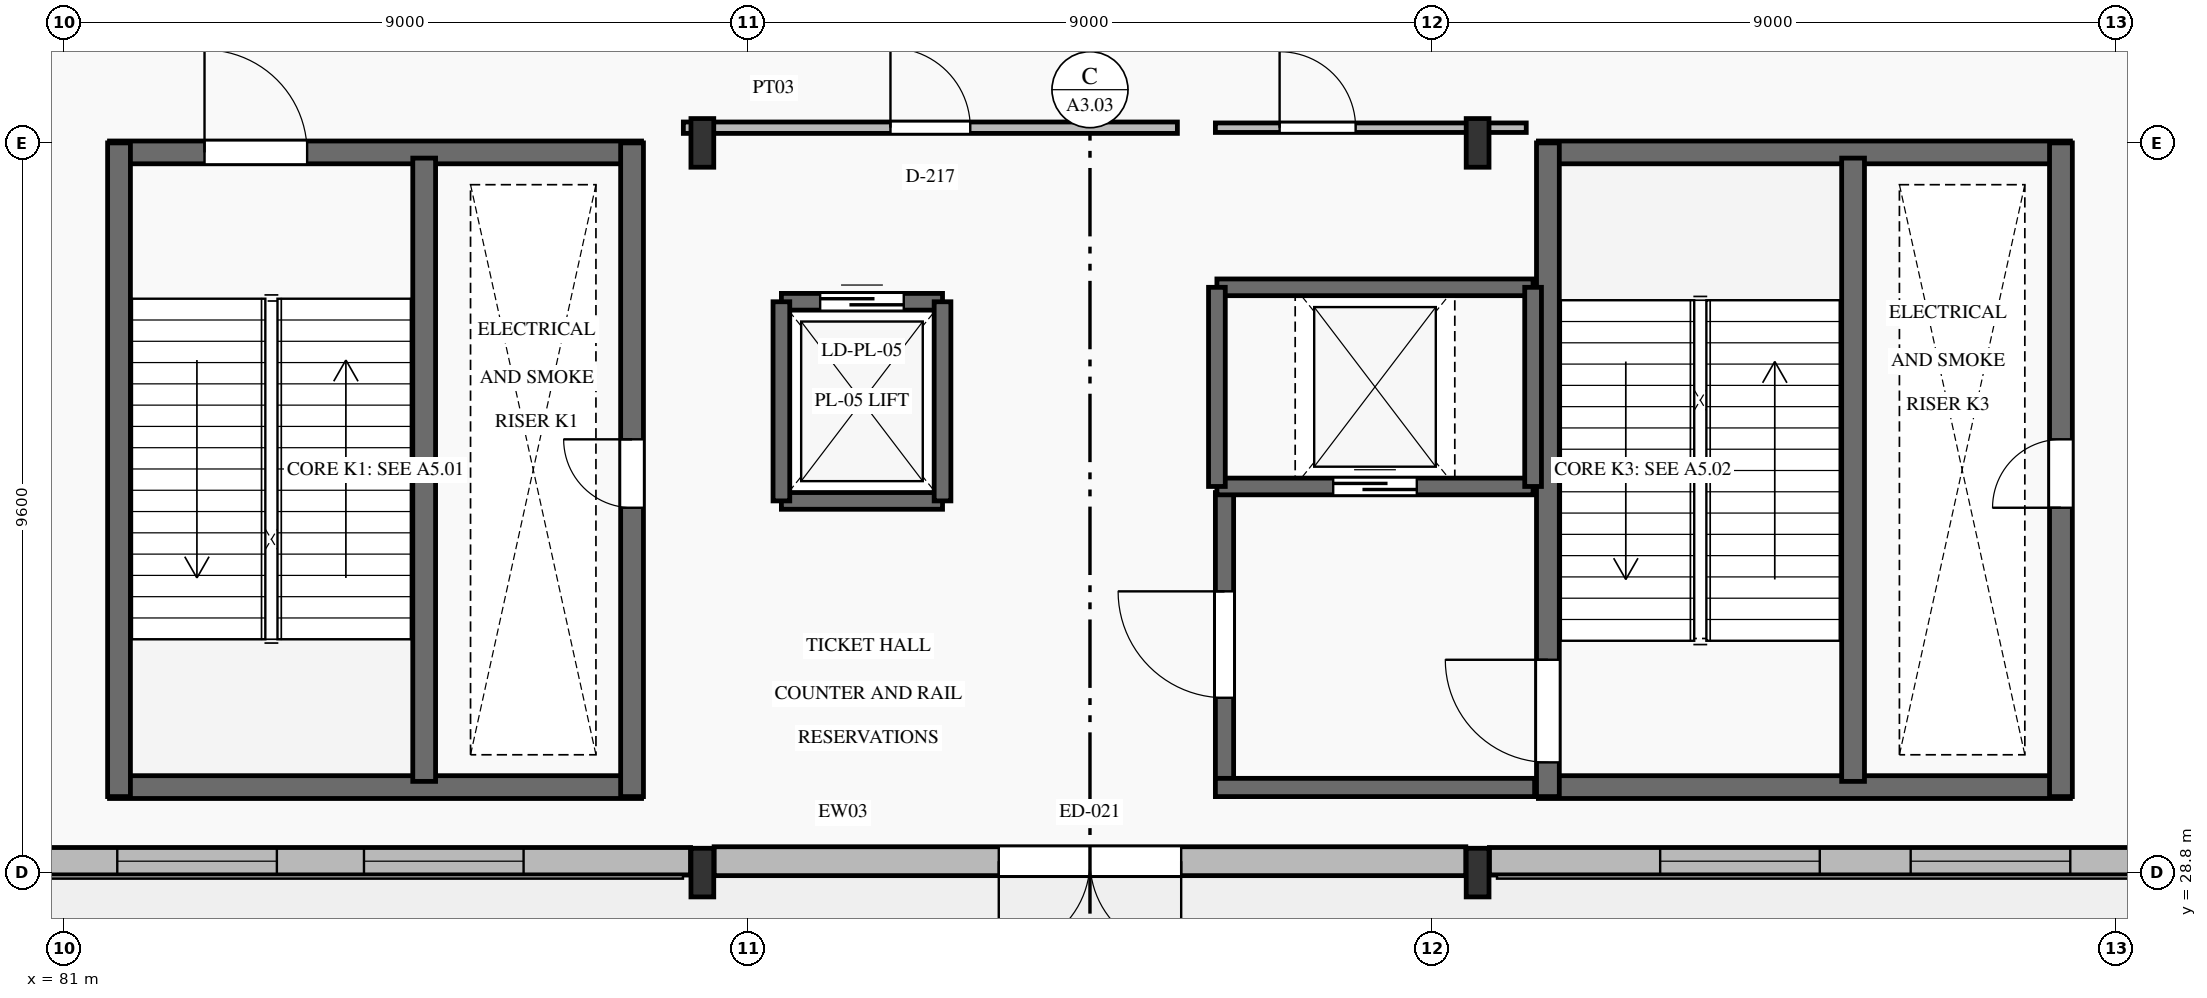
"""IFC4 building model, lengths in metres.
Left out: names, types, materials, properties, quantities, classifications, styles, units other than length and angle.
Written with IfcOpenShell. Run it as: python <this file> out.ifc"""

import sys

from ifc_helpers import new_model, si_unit, direction, frame, frame_2d, origin, origin_2d, place, context, subcontext, project, spatial, rectangle, i_section, extrude, element, fill, save


model = new_model("IFC4")
c1 = context("Model", 3, precision=1e-05, world=origin(), true_north=direction((0.0, 1.0)))
c2 = subcontext(c1, "Body", "Model", "MODEL_VIEW")
j1 = project(units=[si_unit("LENGTHUNIT", "METRE"), si_unit("PLANEANGLEUNIT", "RADIAN")], contexts=[c1])
p1 = place(None, origin())
s1 = spatial("IfcSite", under=j1, at=p1, CompositionType="ELEMENT")
p2 = place(p1, origin())
s2 = spatial("IfcBuilding", under=s1, at=p2, CompositionType="ELEMENT")
p3 = place(p2, origin())
s3 = spatial("IfcBuildingStorey", under=s2, at=p3, CompositionType="ELEMENT", Elevation=0.0)
for number, where, z_axis, x_axis in (
    (1, (89.4, 28.8, 0.0), (0.0, 0.0, 1.0), (1.0, 0.0, 0.0)),
    (2, (89.4, 38.4, 0.0), (0.0, 0.0, 1.0), (1.0, 0.0, 0.0)),
    (3, (99.6, 28.8, 0.0), (0.0, 0.0, 1.0), (1.0, 0.0, 0.0)),
    (4, (99.6, 38.4, 0.0), (0.0, 0.0, 1.0), (1.0, 0.0, 0.0)),
):
    element("IfcColumn", number, at=place(p3, frame(where, z_axis=z_axis, x_axis=x_axis)), inside=s3, PredefinedType="COLUMN", context=c2, shape_type="SweptSolid", body=[
        extrude(i_section(OverallWidth=0.3, OverallDepth=0.64, WebThickness=0.013, FlangeThickness=0.026, FilletRadius=0.027, at=origin_2d()), origin(), (0.0, 0.0, 1.0), 6.0),
    ])
p4 = place(p3, frame((79.505, 28.95, 0.0), z_axis=(0.0, 0.0, 1.0), x_axis=(1.0, 0.0, 0.0)))
e5 = element("IfcWall", 5, at=p4, inside=s3, PredefinedType="SOLIDWALL", context=c2, shape_type="SweptSolid", body=[
    extrude(rectangle(XDim=9.74, YDim=0.36, at=frame_2d((4.87, 0.0))), origin(), (0.0, 0.0, 1.0), 4.92),
])
p5 = place(p4, frame((2.197, 0.0, 0.9)))
e6 = element("IfcOpeningElement", 6, at=p5, cuts=e5, PredefinedType="OPENING", context=c2, shape_type="SweptSolid", body=[
    extrude(rectangle(XDim=2.1, YDim=3.0, at=frame_2d((1.05, 1.5))), frame((0.0, 0.195, 0.0), z_axis=(0.0, -1.0, 0.0), x_axis=(1.0, 0.0, 0.0)), (0.0, 0.0, 1.0), 0.39),
])
p6 = place(p4, frame((5.443, 0.0, 0.9)))
e7 = element("IfcOpeningElement", 7, at=p6, cuts=e5, PredefinedType="OPENING", context=c2, shape_type="SweptSolid", body=[
    extrude(rectangle(XDim=2.1, YDim=3.0, at=frame_2d((1.05, 1.5))), frame((0.0, 0.195, 0.0), z_axis=(0.0, -1.0, 0.0), x_axis=(1.0, 0.0, 0.0)), (0.0, 0.0, 1.0), 0.39),
])
p7 = place(p3, frame((89.555, 28.95, 0.0), z_axis=(0.0, 0.0, 1.0), x_axis=(1.0, 0.0, 0.0)))
e8 = element("IfcWall", 8, at=p7, inside=s3, PredefinedType="SOLIDWALL", context=c2, shape_type="SweptSolid", body=[
    extrude(rectangle(XDim=9.89, YDim=0.38, at=frame_2d((4.945, 0.0))), origin(), (0.0, 0.0, 1.0), 4.92),
])
p8 = place(p7, frame((3.745, 0.0, 0.0)))
e9 = element("IfcOpeningElement", 9, at=p8, cuts=e8, PredefinedType="OPENING", context=c2, shape_type="SweptSolid", body=[
    extrude(rectangle(XDim=2.4, YDim=2.5, at=frame_2d((1.2, 1.25))), frame((0.0, 0.205, 0.0), z_axis=(0.0, -1.0, 0.0), x_axis=(1.0, 0.0, 0.0)), (0.0, 0.0, 1.0), 0.41),
])
p9 = place(p3, frame((99.755, 28.95, 0.0), z_axis=(0.0, 0.0, 1.0), x_axis=(1.0, 0.0, 0.0)))
e10 = element("IfcWall", 10, at=p9, inside=s3, PredefinedType="SOLIDWALL", context=c2, shape_type="SweptSolid", body=[
    extrude(rectangle(XDim=9.89, YDim=0.36, at=frame_2d((4.945, 0.0))), origin(), (0.0, 0.0, 1.0), 4.92),
])
p10 = place(p9, frame((2.247, 0.0, 0.9)))
e11 = element("IfcOpeningElement", 11, at=p10, cuts=e10, PredefinedType="OPENING", context=c2, shape_type="SweptSolid", body=[
    extrude(rectangle(XDim=2.1, YDim=3.0, at=frame_2d((1.05, 1.5))), frame((0.0, 0.195, 0.0), z_axis=(0.0, -1.0, 0.0), x_axis=(1.0, 0.0, 0.0)), (0.0, 0.0, 1.0), 0.39),
])
p11 = place(p9, frame((5.543, 0.0, 0.9)))
e12 = element("IfcOpeningElement", 12, at=p11, cuts=e10, PredefinedType="OPENING", context=c2, shape_type="SweptSolid", body=[
    extrude(rectangle(XDim=2.1, YDim=3.0, at=frame_2d((1.05, 1.5))), frame((0.0, 0.195, 0.0), z_axis=(0.0, -1.0, 0.0), x_axis=(1.0, 0.0, 0.0)), (0.0, 0.0, 1.0), 0.39),
])
p12 = place(p3, frame((81.6, 29.925, 0.0), z_axis=(0.0, 0.0, 1.0), x_axis=(1.0, 0.0, 0.0)))
e13 = element("IfcWall", 13, at=p12, inside=s3, PredefinedType="SHEAR", context=c2, shape_type="SweptSolid", body=[
    extrude(rectangle(XDim=7.0, YDim=0.3, at=frame_2d((3.5, 0.0))), origin(), (0.0, 0.0, 1.0), 6.0),
])
p13 = place(p3, frame((81.6, 38.275, 0.0), z_axis=(0.0, 0.0, 1.0), x_axis=(1.0, 0.0, 0.0)))
e14 = element("IfcWall", 14, at=p13, inside=s3, PredefinedType="SHEAR", context=c2, shape_type="SweptSolid", body=[
    extrude(rectangle(XDim=7.0, YDim=0.3, at=frame_2d((3.5, 0.0))), origin(), (0.0, 0.0, 1.0), 6.0),
])
p14 = place(p13, frame((1.25, 0.0, 0.0)))
e15 = element("IfcOpeningElement", 15, at=p14, cuts=e14, PredefinedType="OPENING", context=c2, shape_type="SweptSolid", body=[
    extrude(rectangle(XDim=1.35, YDim=2.2, at=frame_2d((0.675, 1.1))), frame((0.0, 0.165, 0.0), z_axis=(0.0, -1.0, 0.0), x_axis=(1.0, 0.0, 0.0)), (0.0, 0.0, 1.0), 0.33),
])
p15 = place(p3, frame((81.725, 29.8, 0.0), z_axis=(0.0, 0.0, 1.0), x_axis=(0.0, 1.0, 0.0)))
e16 = element("IfcWall", 16, at=p15, inside=s3, PredefinedType="SHEAR", context=c2, shape_type="SweptSolid", body=[
    extrude(rectangle(XDim=8.6, YDim=0.3, at=frame_2d((4.3, 0.0))), origin(), (0.0, 0.0, 1.0), 6.0),
])
p16 = place(p3, frame((88.475, 29.8, 0.0), z_axis=(0.0, 0.0, 1.0), x_axis=(0.0, 1.0, 0.0)))
e17 = element("IfcWall", 17, at=p16, inside=s3, PredefinedType="SHEAR", context=c2, shape_type="SweptSolid", body=[
    extrude(rectangle(XDim=8.6, YDim=0.3, at=frame_2d((4.3, 0.0))), origin(), (0.0, 0.0, 1.0), 6.0),
])
p17 = place(p16, frame((3.8, 0.0, 0.0)))
e18 = element("IfcOpeningElement", 18, at=p17, cuts=e17, PredefinedType="OPENING", context=c2, shape_type="SweptSolid", body=[
    extrude(rectangle(XDim=0.9, YDim=2.05, at=frame_2d((0.45, 1.025))), frame((0.0, 0.165, 0.0), z_axis=(0.0, -1.0, 0.0), x_axis=(1.0, 0.0, 0.0)), (0.0, 0.0, 1.0), 0.33),
])
p18 = place(p3, frame((85.74, 30.0, 0.0), z_axis=(0.0, 0.0, 1.0), x_axis=(0.0, 1.0, 0.0)))
e19 = element("IfcWall", 19, at=p18, inside=s3, PredefinedType="SHEAR", context=c2, shape_type="SweptSolid", body=[
    extrude(rectangle(XDim=8.2, YDim=0.3, at=frame_2d((4.1, 0.0))), origin(), (0.0, 0.0, 1.0), 6.0),
])
for number, where, z_axis, x_axis in (
    (20, (100.4, 29.925, 0.0), (0.0, 0.0, 1.0), (1.0, 0.0, 0.0)),
    (21, (100.4, 38.275, 0.0), (0.0, 0.0, 1.0), (1.0, 0.0, 0.0)),
):
    element("IfcWall", number, at=place(p3, frame(where, z_axis=z_axis, x_axis=x_axis)), inside=s3, PredefinedType="SHEAR", context=c2, shape_type="SweptSolid", body=[
        extrude(rectangle(XDim=7.0, YDim=0.3, at=frame_2d((3.5, 0.0))), origin(), (0.0, 0.0, 1.0), 6.0),
    ])
p19 = place(p3, frame((100.525, 29.8, 0.0), z_axis=(0.0, 0.0, 1.0), x_axis=(0.0, 1.0, 0.0)))
e22 = element("IfcWall", 22, at=p19, inside=s3, PredefinedType="SHEAR", context=c2, shape_type="SweptSolid", body=[
    extrude(rectangle(XDim=8.6, YDim=0.3, at=frame_2d((4.3, 0.0))), origin(), (0.0, 0.0, 1.0), 6.0),
])
p20 = place(p19, frame((0.45, 0.0, 0.0)))
e23 = element("IfcOpeningElement", 23, at=p20, cuts=e22, PredefinedType="OPENING", context=c2, shape_type="SweptSolid", body=[
    extrude(rectangle(XDim=1.35, YDim=2.2, at=frame_2d((0.675, 1.1))), frame((0.0, 0.165, 0.0), z_axis=(0.0, -1.0, 0.0), x_axis=(1.0, 0.0, 0.0)), (0.0, 0.0, 1.0), 0.33),
])
p21 = place(p3, frame((107.275, 29.8, 0.0), z_axis=(0.0, 0.0, 1.0), x_axis=(0.0, 1.0, 0.0)))
e24 = element("IfcWall", 24, at=p21, inside=s3, PredefinedType="SHEAR", context=c2, shape_type="SweptSolid", body=[
    extrude(rectangle(XDim=8.6, YDim=0.3, at=frame_2d((4.3, 0.0))), origin(), (0.0, 0.0, 1.0), 6.0),
])
p22 = place(p21, frame((3.8, 0.0, 0.0)))
e25 = element("IfcOpeningElement", 25, at=p22, cuts=e24, PredefinedType="OPENING", context=c2, shape_type="SweptSolid", body=[
    extrude(rectangle(XDim=0.9, YDim=2.05, at=frame_2d((0.45, 1.025))), frame((0.0, 0.165, 0.0), z_axis=(0.0, -1.0, 0.0), x_axis=(1.0, 0.0, 0.0)), (0.0, 0.0, 1.0), 0.33),
])
p23 = place(p3, frame((104.54, 30.0, 0.0), z_axis=(0.0, 0.0, 1.0), x_axis=(0.0, 1.0, 0.0)))
e26 = element("IfcWall", 26, at=p23, inside=s3, PredefinedType="SHEAR", context=c2, shape_type="SweptSolid", body=[
    extrude(rectangle(XDim=8.2, YDim=0.3, at=frame_2d((4.1, 0.0))), origin(), (0.0, 0.0, 1.0), 6.0),
])
p24 = place(p3, frame((96.27, 29.8, 0.0), z_axis=(0.0, 0.0, 1.0), x_axis=(0.0, 1.0, 0.0)))
e27 = element("IfcWall", 27, at=p24, inside=s3, PredefinedType="SHEAR", context=c2, shape_type="SweptSolid", body=[
    extrude(rectangle(XDim=4.0, YDim=0.24, at=frame_2d((2.0, 0.0))), origin(), (0.0, 0.0, 1.0), 6.0),
])
p25 = place(p24, frame((1.3, 0.0, 0.0)))
e28 = element("IfcOpeningElement", 28, at=p25, cuts=e27, PredefinedType="OPENING", context=c2, shape_type="SweptSolid", body=[
    extrude(rectangle(XDim=1.4, YDim=2.2, at=frame_2d((0.7, 1.1))), frame((0.0, 0.135, 0.0), z_axis=(0.0, -1.0, 0.0), x_axis=(1.0, 0.0, 0.0)), (0.0, 0.0, 1.0), 0.27),
])
p26 = place(p3, frame((96.15, 29.92, 0.0), z_axis=(0.0, 0.0, 1.0), x_axis=(1.0, 0.0, 0.0)))
e29 = element("IfcWall", 29, at=p26, inside=s3, PredefinedType="SHEAR", context=c2, shape_type="SweptSolid", body=[
    extrude(rectangle(XDim=4.2, YDim=0.24, at=frame_2d((2.1, 0.0))), origin(), (0.0, 0.0, 1.0), 6.0),
])
p27 = place(p3, frame((90.44, 33.69, 0.0), z_axis=(0.0, 0.0, 1.0), x_axis=(1.0, 0.0, 0.0)))
e30 = element("IfcWall", 30, at=p27, inside=s3, PredefinedType="SHEAR", context=c2, shape_type="SweptSolid", body=[
    extrude(rectangle(XDim=2.12, YDim=0.22, at=frame_2d((1.06, 0.0))), origin(), (0.0, 0.0, 1.0), 6.0),
])
p28 = place(p3, frame((90.44, 36.31, 0.0), z_axis=(0.0, 0.0, 1.0), x_axis=(1.0, 0.0, 0.0)))
e31 = element("IfcWall", 31, at=p28, inside=s3, PredefinedType="SHEAR", context=c2, shape_type="SweptSolid", body=[
    extrude(rectangle(XDim=2.12, YDim=0.22, at=frame_2d((1.06, 0.0))), origin(), (0.0, 0.0, 1.0), 6.0),
])
p29 = place(p28, frame((0.51, 0.0, 0.0)))
e32 = element("IfcOpeningElement", 32, at=p29, cuts=e31, PredefinedType="OPENING", context=c2, shape_type="SweptSolid", body=[
    extrude(rectangle(XDim=1.1, YDim=2.15, at=frame_2d((0.55, 1.075))), frame((0.0, 0.125, 0.0), z_axis=(0.0, -1.0, 0.0), x_axis=(1.0, 0.0, 0.0)), (0.0, 0.0, 1.0), 0.25),
])
for number, where, z_axis, x_axis in (
    (33, (90.44, 33.69, 0.0), (0.0, 0.0, 1.0), (0.0, 1.0, 0.0)),
    (34, (92.56, 33.69, 0.0), (0.0, 0.0, 1.0), (0.0, 1.0, 0.0)),
):
    element("IfcWall", number, at=place(p3, frame(where, z_axis=z_axis, x_axis=x_axis)), inside=s3, PredefinedType="SHEAR", context=c2, shape_type="SweptSolid", body=[
        extrude(rectangle(XDim=2.62, YDim=0.22, at=frame_2d((1.31, 0.0))), origin(), (0.0, 0.0, 1.0), 6.0),
    ])
p30 = place(p3, frame((96.17, 33.88, 0.0), z_axis=(0.0, 0.0, 1.0), x_axis=(1.0, 0.0, 0.0)))
e35 = element("IfcWall", 35, at=p30, inside=s3, PredefinedType="SHEAR", context=c2, shape_type="SweptSolid", body=[
    extrude(rectangle(XDim=4.16, YDim=0.22, at=frame_2d((2.08, 0.0))), origin(), (0.0, 0.0, 1.0), 6.0),
])
p31 = place(p30, frame((1.53, 0.0, 0.0)))
e36 = element("IfcOpeningElement", 36, at=p31, cuts=e35, PredefinedType="OPENING", context=c2, shape_type="SweptSolid", body=[
    extrude(rectangle(XDim=1.1, YDim=2.15, at=frame_2d((0.55, 1.075))), frame((0.0, 0.125, 0.0), z_axis=(0.0, -1.0, 0.0), x_axis=(1.0, 0.0, 0.0)), (0.0, 0.0, 1.0), 0.25),
])
p32 = place(p3, frame((96.17, 36.5, 0.0), z_axis=(0.0, 0.0, 1.0), x_axis=(1.0, 0.0, 0.0)))
e37 = element("IfcWall", 37, at=p32, inside=s3, PredefinedType="SHEAR", context=c2, shape_type="SweptSolid", body=[
    extrude(rectangle(XDim=4.16, YDim=0.22, at=frame_2d((2.08, 0.0))), origin(), (0.0, 0.0, 1.0), 6.0),
])
for number, where, z_axis, x_axis in (
    (38, (96.17, 33.88, 0.0), (0.0, 0.0, 1.0), (0.0, 1.0, 0.0)),
    (39, (100.33, 33.88, 0.0), (0.0, 0.0, 1.0), (0.0, 1.0, 0.0)),
):
    element("IfcWall", number, at=place(p3, frame(where, z_axis=z_axis, x_axis=x_axis)), inside=s3, PredefinedType="SHEAR", context=c2, shape_type="SweptSolid", body=[
        extrude(rectangle(XDim=2.62, YDim=0.22, at=frame_2d((1.31, 0.0))), origin(), (0.0, 0.0, 1.0), 6.0),
    ])
p33 = place(p3, frame((89.15, 38.6, 0.0), z_axis=(0.0, 0.0, 1.0), x_axis=(1.0, 0.0, 0.0)))
e40 = element("IfcWall", 40, at=p33, inside=s3, PredefinedType="PARTITIONING", context=c2, shape_type="SweptSolid", body=[
    extrude(rectangle(XDim=6.5, YDim=0.15, at=frame_2d((3.25, 0.0))), origin(), (0.0, 0.0, 1.0), 4.92),
])
p34 = place(p33, frame((2.725, 0.0, 0.0)))
e41 = element("IfcOpeningElement", 41, at=p34, cuts=e40, PredefinedType="OPENING", context=c2, shape_type="SweptSolid", body=[
    extrude(rectangle(XDim=1.05, YDim=2.2, at=frame_2d((0.525, 1.1))), frame((0.0, 0.09, 0.0), z_axis=(0.0, -1.0, 0.0), x_axis=(1.0, 0.0, 0.0)), (0.0, 0.0, 1.0), 0.18),
])
p35 = place(p3, frame((96.15, 38.6, 0.0), z_axis=(0.0, 0.0, 1.0), x_axis=(1.0, 0.0, 0.0)))
e42 = element("IfcWall", 42, at=p35, inside=s3, PredefinedType="PARTITIONING", context=c2, shape_type="SweptSolid", body=[
    extrude(rectangle(XDim=4.09, YDim=0.125, at=frame_2d((2.045, 0.0))), origin(), (0.0, 0.0, 1.0), 4.92),
])
p36 = place(p35, frame((0.845, 0.0, 0.0)))
e43 = element("IfcOpeningElement", 43, at=p36, cuts=e42, PredefinedType="OPENING", context=c2, shape_type="SweptSolid", body=[
    extrude(rectangle(XDim=1.0, YDim=2.15, at=frame_2d((0.5, 1.075))), frame((0.0, 0.077, 0.0), z_axis=(0.0, -1.0, 0.0), x_axis=(1.0, 0.0, 0.0)), (0.0, 0.0, 1.0), 0.155),
])
p37 = place(p5, origin())
e44 = element("IfcWindow", 44, at=p37, inside=s3, PartitioningType="SINGLE_PANEL", PredefinedType="WINDOW", context=c2, shape_type="SweptSolid", body=[
    extrude(rectangle(XDim=2.1, YDim=3.0, at=frame_2d((1.05, 1.5))), frame((0.0, 0.03, 0.0), z_axis=(0.0, -1.0, 0.0), x_axis=(1.0, 0.0, 0.0)), (0.0, 0.0, 1.0), 0.06),
])
fill(e6, e44)
p38 = place(p6, origin())
e45 = element("IfcWindow", 45, at=p38, inside=s3, PartitioningType="SINGLE_PANEL", PredefinedType="WINDOW", context=c2, shape_type="SweptSolid", body=[
    extrude(rectangle(XDim=2.1, YDim=3.0, at=frame_2d((1.05, 1.5))), frame((0.0, 0.03, 0.0), z_axis=(0.0, -1.0, 0.0), x_axis=(1.0, 0.0, 0.0)), (0.0, 0.0, 1.0), 0.06),
])
fill(e7, e45)
p39 = place(p8, frame((2.4, 0.0, 0.0), z_axis=(0.0, 0.0, 1.0), x_axis=(-1.0, 0.0, 0.0)))
e46 = element("IfcDoor", 46, at=p39, inside=s3, OperationType="DOUBLE_DOOR_SINGLE_SWING", PredefinedType="DOOR", context=c2, shape_type="SweptSolid", body=[
    extrude(rectangle(XDim=2.4, YDim=2.5, at=frame_2d((1.2, 1.25))), frame((0.0, 0.025, 0.0), z_axis=(0.0, -1.0, 0.0), x_axis=(1.0, 0.0, 0.0)), (0.0, 0.0, 1.0), 0.05),
])
fill(e9, e46)
p40 = place(p10, origin())
e47 = element("IfcWindow", 47, at=p40, inside=s3, PartitioningType="SINGLE_PANEL", PredefinedType="WINDOW", context=c2, shape_type="SweptSolid", body=[
    extrude(rectangle(XDim=2.1, YDim=3.0, at=frame_2d((1.05, 1.5))), frame((0.0, 0.03, 0.0), z_axis=(0.0, -1.0, 0.0), x_axis=(1.0, 0.0, 0.0)), (0.0, 0.0, 1.0), 0.06),
])
fill(e11, e47)
p41 = place(p11, origin())
e48 = element("IfcWindow", 48, at=p41, inside=s3, PartitioningType="SINGLE_PANEL", PredefinedType="WINDOW", context=c2, shape_type="SweptSolid", body=[
    extrude(rectangle(XDim=2.1, YDim=3.0, at=frame_2d((1.05, 1.5))), frame((0.0, 0.03, 0.0), z_axis=(0.0, -1.0, 0.0), x_axis=(1.0, 0.0, 0.0)), (0.0, 0.0, 1.0), 0.06),
])
fill(e12, e48)
p42 = place(p14, origin())
e49 = element("IfcDoor", 49, at=p42, inside=s3, OperationType="SINGLE_SWING_LEFT", PredefinedType="DOOR", context=c2, shape_type="SweptSolid", body=[
    extrude(rectangle(XDim=1.35, YDim=2.2, at=frame_2d((0.675, 1.1))), frame((0.0, 0.025, 0.0), z_axis=(0.0, -1.0, 0.0), x_axis=(1.0, 0.0, 0.0)), (0.0, 0.0, 1.0), 0.05),
])
fill(e15, e49)
p43 = place(p17, origin())
e50 = element("IfcDoor", 50, at=p43, inside=s3, OperationType="SINGLE_SWING_RIGHT", PredefinedType="DOOR", context=c2, shape_type="SweptSolid", body=[
    extrude(rectangle(XDim=0.9, YDim=2.05, at=frame_2d((0.45, 1.025))), frame((0.0, 0.025, 0.0), z_axis=(0.0, -1.0, 0.0), x_axis=(1.0, 0.0, 0.0)), (0.0, 0.0, 1.0), 0.05),
])
fill(e18, e50)
p44 = place(p20, origin())
e51 = element("IfcDoor", 51, at=p44, inside=s3, OperationType="SINGLE_SWING_RIGHT", PredefinedType="DOOR", context=c2, shape_type="SweptSolid", body=[
    extrude(rectangle(XDim=1.35, YDim=2.2, at=frame_2d((0.675, 1.1))), frame((0.0, 0.025, 0.0), z_axis=(0.0, -1.0, 0.0), x_axis=(1.0, 0.0, 0.0)), (0.0, 0.0, 1.0), 0.05),
])
fill(e23, e51)
p45 = place(p22, origin())
e52 = element("IfcDoor", 52, at=p45, inside=s3, OperationType="SINGLE_SWING_LEFT", PredefinedType="DOOR", context=c2, shape_type="SweptSolid", body=[
    extrude(rectangle(XDim=0.9, YDim=2.05, at=frame_2d((0.45, 1.025))), frame((0.0, 0.025, 0.0), z_axis=(0.0, -1.0, 0.0), x_axis=(1.0, 0.0, 0.0)), (0.0, 0.0, 1.0), 0.05),
])
fill(e25, e52)
p46 = place(p25, origin())
e53 = element("IfcDoor", 53, at=p46, inside=s3, OperationType="SINGLE_SWING_RIGHT", PredefinedType="DOOR", context=c2, shape_type="SweptSolid", body=[
    extrude(rectangle(XDim=1.4, YDim=2.2, at=frame_2d((0.7, 1.1))), frame((0.0, 0.025, 0.0), z_axis=(0.0, -1.0, 0.0), x_axis=(1.0, 0.0, 0.0)), (0.0, 0.0, 1.0), 0.05),
])
fill(e28, e53)
p47 = place(p29, origin())
e54 = element("IfcDoor", 54, at=p47, inside=s3, OperationType="SLIDING_TO_RIGHT", PredefinedType="DOOR", context=c2, shape_type="SweptSolid", body=[
    extrude(rectangle(XDim=1.1, YDim=2.15, at=frame_2d((0.55, 1.075))), frame((0.0, 0.025, 0.0), z_axis=(0.0, -1.0, 0.0), x_axis=(1.0, 0.0, 0.0)), (0.0, 0.0, 1.0), 0.05),
])
fill(e32, e54)
p48 = place(p31, origin())
e55 = element("IfcDoor", 55, at=p48, inside=s3, OperationType="SLIDING_TO_LEFT", PredefinedType="DOOR", context=c2, shape_type="SweptSolid", body=[
    extrude(rectangle(XDim=1.1, YDim=2.15, at=frame_2d((0.55, 1.075))), frame((0.0, 0.025, 0.0), z_axis=(0.0, -1.0, 0.0), x_axis=(1.0, 0.0, 0.0)), (0.0, 0.0, 1.0), 0.05),
])
fill(e36, e55)
p49 = place(p34, origin())
e56 = element("IfcDoor", 56, at=p49, inside=s3, OperationType="SINGLE_SWING_LEFT", PredefinedType="DOOR", context=c2, shape_type="SweptSolid", body=[
    extrude(rectangle(XDim=1.05, YDim=2.2, at=frame_2d((0.525, 1.1))), frame((0.0, 0.025, 0.0), z_axis=(0.0, -1.0, 0.0), x_axis=(1.0, 0.0, 0.0)), (0.0, 0.0, 1.0), 0.05),
])
fill(e41, e56)
p50 = place(p36, origin())
e57 = element("IfcDoor", 57, at=p50, inside=s3, OperationType="SINGLE_SWING_LEFT", PredefinedType="DOOR", context=c2, shape_type="SweptSolid", body=[
    extrude(rectangle(XDim=1.0, YDim=2.15, at=frame_2d((0.5, 1.075))), frame((0.0, 0.025, 0.0), z_axis=(0.0, -1.0, 0.0), x_axis=(1.0, 0.0, 0.0)), (0.0, 0.0, 1.0), 0.05),
])
fill(e43, e57)
save(model, sys.argv[1])
